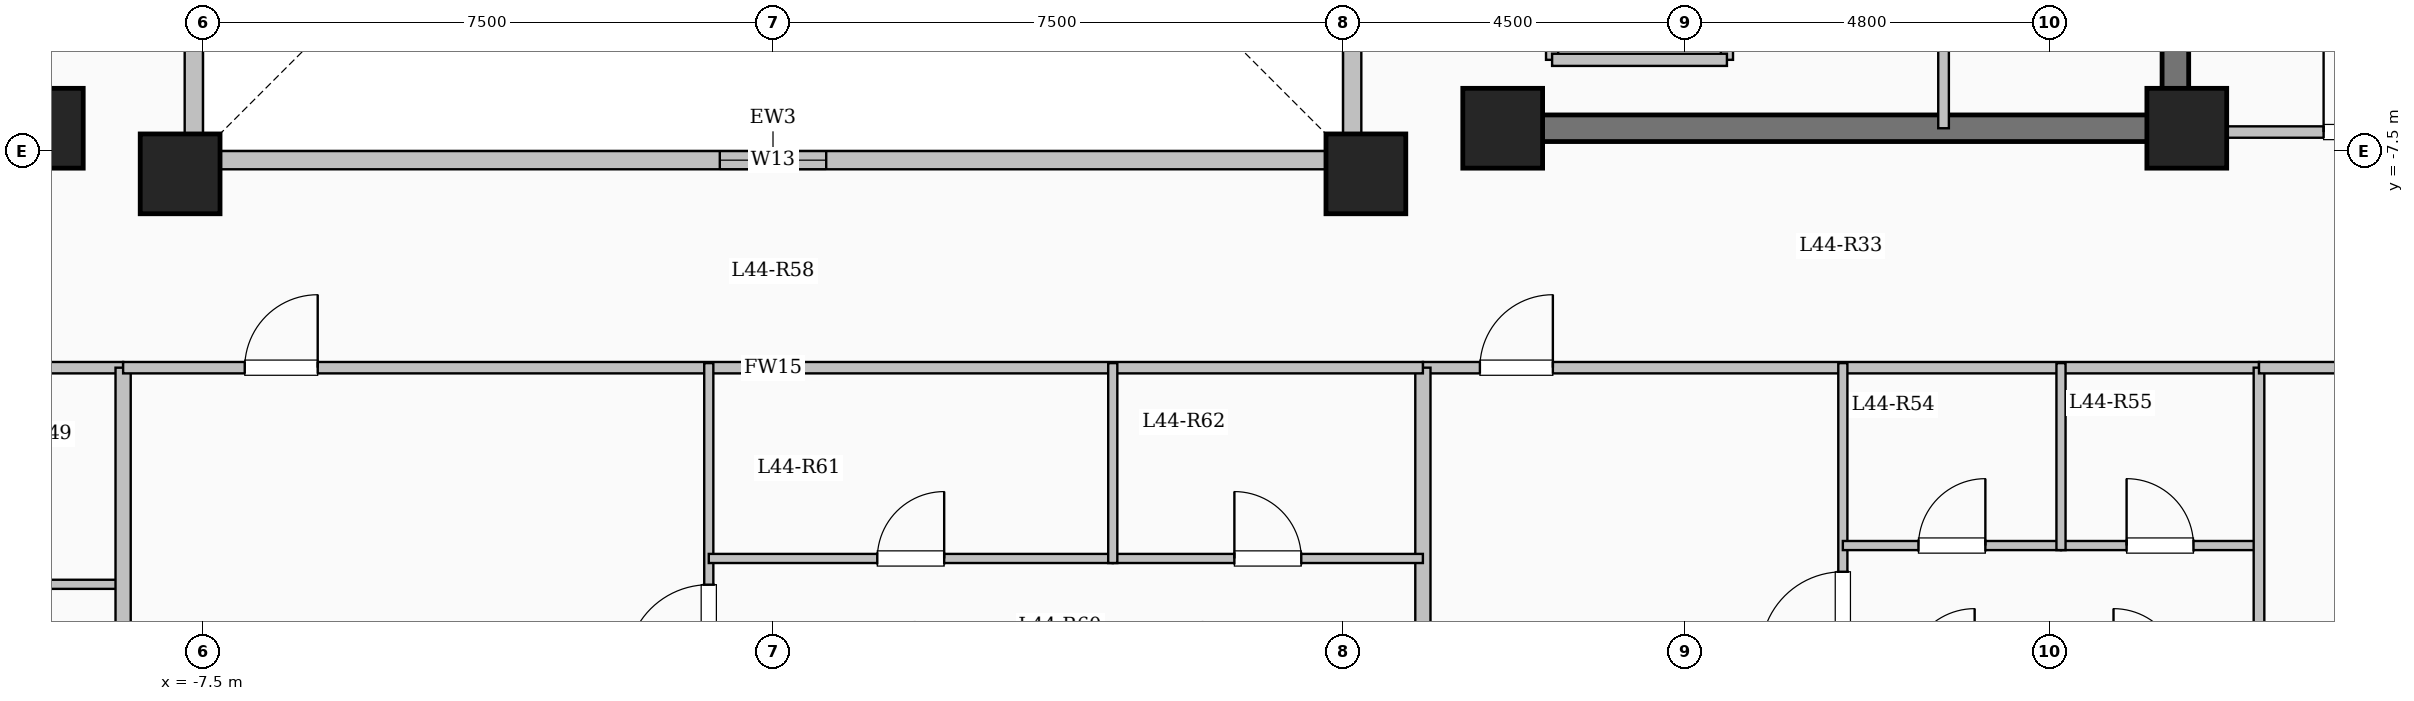
"""IFC4 building model, lengths in metres.
Left out: names, types, materials, properties, quantities, classifications, styles, units other than length and angle.
Written with IfcOpenShell. Run it as: python <this file> out.ifc"""

import sys

from ifc_helpers import new_model, si_unit, direction, frame, frame_2d, origin, origin_2d, place, context, subcontext, project, spatial, rectangle, extrude, element, fill, save


model = new_model("IFC4")
c1 = context("Model", 3, precision=1e-05, world=origin(), true_north=direction((0.0, 1.0)))
c2 = subcontext(c1, "Body", "Model", "MODEL_VIEW")
j1 = project(units=[si_unit("LENGTHUNIT", "METRE"), si_unit("PLANEANGLEUNIT", "RADIAN")], contexts=[c1])
p1 = place(None, origin())
s1 = spatial("IfcSite", under=j1, at=p1, CompositionType="ELEMENT")
p2 = place(p1, origin())
s2 = spatial("IfcBuilding", under=s1, at=p2, CompositionType="ELEMENT")
p3 = place(p2, frame((0.0, 0.0, 162.75)))
s3 = spatial("IfcBuildingStorey", under=s2, at=p3, CompositionType="ELEMENT", Elevation=162.75)
for number, where, z_axis, x_axis in (
    (1, (-7.8, -7.8, 0.0), (0.0, 0.0, 1.0), (1.0, 0.0, 0.0)),
    (2, (7.8, -7.8, 0.0), (0.0, 0.0, 1.0), (1.0, 0.0, 0.0)),
    (3, (-9.6, -7.2, 0.0), (0.0, 0.0, 1.0), (1.0, 0.0, 0.0)),
    (4, (9.6, -7.2, 0.0), (0.0, 0.0, 1.0), (1.0, 0.0, 0.0)),
    (5, (18.6, -7.2, 0.0), (0.0, 0.0, 1.0), (1.0, 0.0, 0.0)),
):
    element("IfcColumn", number, at=place(p3, frame(where, z_axis=z_axis, x_axis=x_axis)), inside=s3, PredefinedType="COLUMN", context=c2, shape_type="SweptSolid", body=[
        extrude(rectangle(XDim=1.05, YDim=1.05, at=origin_2d()), origin(), (0.0, 0.0, 1.0), 3.35),
    ])
p4 = place(p3, frame((-7.62, -7.62, 0.0), z_axis=(0.0, 0.0, 1.0), x_axis=(1.0, 0.0, 0.0)))
e6 = element("IfcWall", 6, at=p4, inside=s3, PredefinedType="SOLIDWALL", context=c2, shape_type="SweptSolid", body=[
    extrude(rectangle(XDim=15.24, YDim=0.24, at=frame_2d((7.62, 0.0))), origin(), (0.0, 0.0, 1.0), 3.1),
])
p5 = place(p4, frame((6.92, 0.0, 0.95)))
e7 = element("IfcOpeningElement", 7, at=p5, cuts=e6, PredefinedType="OPENING", context=c2, shape_type="SweptSolid", body=[
    extrude(rectangle(XDim=1.4, YDim=1.5, at=frame_2d((0.7, 0.75))), frame((0.0, 0.13, 0.0), z_axis=(0.0, -1.0, 0.0), x_axis=(1.0, 0.0, 0.0)), (0.0, 0.0, 1.0), 0.26),
])
p6 = place(p3, frame((7.62, -7.62, 0.0), z_axis=(0.0, 0.0, 1.0), x_axis=(0.0, 1.0, 0.0)))
e8 = element("IfcWall", 8, at=p6, inside=s3, PredefinedType="SOLIDWALL", context=c2, shape_type="SweptSolid", body=[
    extrude(rectangle(XDim=15.24, YDim=0.24, at=frame_2d((7.62, 0.0))), origin(), (0.0, 0.0, 1.0), 3.1),
])
p7 = place(p6, frame((6.92, 0.0, 0.95)))
e9 = element("IfcOpeningElement", 9, at=p7, cuts=e8, PredefinedType="OPENING", context=c2, shape_type="SweptSolid", body=[
    extrude(rectangle(XDim=1.4, YDim=1.5, at=frame_2d((0.7, 0.75))), frame((0.0, 0.13, 0.0), z_axis=(0.0, -1.0, 0.0), x_axis=(1.0, 0.0, 0.0)), (0.0, 0.0, 1.0), 0.26),
])
p8 = place(p3, frame((-7.62, 7.62, 0.0), z_axis=(0.0, 0.0, 1.0), x_axis=(0.0, -1.0, 0.0)))
e10 = element("IfcWall", 10, at=p8, inside=s3, PredefinedType="SOLIDWALL", context=c2, shape_type="SweptSolid", body=[
    extrude(rectangle(XDim=15.24, YDim=0.24, at=frame_2d((7.62, 0.0))), origin(), (0.0, 0.0, 1.0), 3.1),
])
p9 = place(p8, frame((6.92, 0.0, 0.95)))
e11 = element("IfcOpeningElement", 11, at=p9, cuts=e10, PredefinedType="OPENING", context=c2, shape_type="SweptSolid", body=[
    extrude(rectangle(XDim=1.4, YDim=1.5, at=frame_2d((0.7, 0.75))), frame((0.0, 0.13, 0.0), z_axis=(0.0, -1.0, 0.0), x_axis=(1.0, 0.0, 0.0)), (0.0, 0.0, 1.0), 0.26),
])
p10 = place(p3, frame((10.25, -6.3, 0.0), z_axis=(0.0, 0.0, 1.0), x_axis=(0.0, 1.0, 0.0)))
e12 = element("IfcWall", 12, at=p10, inside=s3, PredefinedType="SOLIDWALL", context=c2, shape_type="SweptSolid", body=[
    extrude(rectangle(XDim=2.6, YDim=0.16, at=frame_2d((1.3, 0.0))), origin(), (0.0, 0.0, 1.0), 3.1),
])
p11 = place(p10, frame((0.75, 0.0, 0.0)))
e13 = element("IfcOpeningElement", 13, at=p11, cuts=e12, PredefinedType="OPENING", context=c2, shape_type="SweptSolid", body=[
    extrude(rectangle(XDim=1.1, YDim=2.15, at=frame_2d((0.55, 1.075))), frame((0.0, 0.09, 0.0), z_axis=(0.0, -1.0, 0.0), x_axis=(1.0, 0.0, 0.0)), (0.0, 0.0, 1.0), 0.18),
])
p12 = place(p3, frame((12.55, -6.3, 0.0), z_axis=(0.0, 0.0, 1.0), x_axis=(0.0, 1.0, 0.0)))
e14 = element("IfcWall", 14, at=p12, inside=s3, PredefinedType="SOLIDWALL", context=c2, shape_type="SweptSolid", body=[
    extrude(rectangle(XDim=2.6, YDim=0.16, at=frame_2d((1.3, 0.0))), origin(), (0.0, 0.0, 1.0), 3.1),
])
p13 = place(p3, frame((10.25, -6.3, 0.0), z_axis=(0.0, 0.0, 1.0), x_axis=(1.0, 0.0, 0.0)))
e15 = element("IfcWall", 15, at=p13, inside=s3, PredefinedType="SOLIDWALL", context=c2, shape_type="SweptSolid", body=[
    extrude(rectangle(XDim=2.3, YDim=0.16, at=frame_2d((1.15, 0.0))), origin(), (0.0, 0.0, 1.0), 3.1),
])
p14 = place(p3, frame((18.45, -7.375, 0.0), z_axis=(0.0, 0.0, 1.0), x_axis=(0.0, 1.0, 0.0)))
e16 = element("IfcWall", 16, at=p14, inside=s3, PredefinedType="SHEAR", context=c2, shape_type="SweptSolid", body=[
    extrude(rectangle(XDim=14.05, YDim=0.35, at=frame_2d((7.025, 0.0))), origin(), (0.0, 0.0, 1.0), 3.35),
])
p15 = place(p3, frame((10.075, -7.2, 0.0), z_axis=(0.0, 0.0, 1.0), x_axis=(1.0, 0.0, 0.0)))
e17 = element("IfcWall", 17, at=p15, inside=s3, PredefinedType="SHEAR", context=c2, shape_type="SweptSolid", body=[
    extrude(rectangle(XDim=8.55, YDim=0.35, at=frame_2d((4.275, 0.0))), origin(), (0.0, 0.0, 1.0), 3.35),
])
p16 = place(p3, frame((15.4, -7.2, 0.0), z_axis=(0.0, 0.0, 1.0), x_axis=(0.0, 1.0, 0.0)))
e18 = element("IfcWall", 18, at=p16, inside=s3, PredefinedType="PARTITIONING", context=c2, shape_type="SweptSolid", body=[
    extrude(rectangle(XDim=10.45, YDim=0.14, at=frame_2d((5.225, 0.0))), origin(), (0.0, 0.0, 1.0), 3.1),
])
p17 = place(p16, frame((9.25, 0.0, 0.0)))
e19 = element("IfcOpeningElement", 19, at=p17, cuts=e18, PredefinedType="OPENING", context=c2, shape_type="SweptSolid", body=[
    extrude(rectangle(XDim=0.9, YDim=2.08, at=frame_2d((0.45, 1.04))), frame((0.0, 0.08, 0.0), z_axis=(0.0, -1.0, 0.0), x_axis=(1.0, 0.0, 0.0)), (0.0, 0.0, 1.0), 0.16),
])
p18 = place(p3, frame((-19.55, -10.35, 0.0), z_axis=(0.0, 0.0, 1.0), x_axis=(1.0, 0.0, 0.0)))
e20 = element("IfcWall", 20, at=p18, inside=s3, PredefinedType="PARTITIONING", context=c2, shape_type="SweptSolid", body=[
    extrude(rectangle(XDim=11.0, YDim=0.15, at=frame_2d((5.5, 0.0))), origin(), (0.0, 0.0, 1.0), 3.1),
])
p19 = place(p18, frame((0.7, 0.0, 0.0)))
e21 = element("IfcOpeningElement", 21, at=p19, cuts=e20, PredefinedType="OPENING", context=c2, shape_type="SweptSolid", body=[
    extrude(rectangle(XDim=0.96, YDim=2.15, at=frame_2d((0.48, 1.075))), frame((0.0, 0.085, 0.0), z_axis=(0.0, -1.0, 0.0), x_axis=(1.0, 0.0, 0.0)), (0.0, 0.0, 1.0), 0.17),
])
p20 = place(p3, frame((8.55, -10.35, 0.0), z_axis=(0.0, 0.0, 1.0), x_axis=(1.0, 0.0, 0.0)))
e22 = element("IfcWall", 22, at=p20, inside=s3, PredefinedType="PARTITIONING", context=c2, shape_type="SweptSolid", body=[
    extrude(rectangle(XDim=11.0, YDim=0.15, at=frame_2d((5.5, 0.0))), origin(), (0.0, 0.0, 1.0), 3.1),
])
p21 = place(p20, frame((0.75, 0.0, 0.0)))
e23 = element("IfcOpeningElement", 23, at=p21, cuts=e22, PredefinedType="OPENING", context=c2, shape_type="SweptSolid", body=[
    extrude(rectangle(XDim=0.96, YDim=2.15, at=frame_2d((0.48, 1.075))), frame((0.0, 0.085, 0.0), z_axis=(0.0, -1.0, 0.0), x_axis=(1.0, 0.0, 0.0)), (0.0, 0.0, 1.0), 0.17),
])
p22 = place(p3, frame((-11.422, -13.2, 0.0), z_axis=(0.0, 0.0, 1.0), x_axis=(1.0, 0.0, 0.0)))
e24 = element("IfcWall", 24, at=p22, inside=s3, PredefinedType="PARTITIONING", context=c2, shape_type="SweptSolid", body=[
    extrude(rectangle(XDim=2.822, YDim=0.12, at=frame_2d((1.411, 0.0))), origin(), (0.0, 0.0, 1.0), 3.1),
])
p23 = place(p22, frame((0.971, 0.0, 0.0)))
e25 = element("IfcOpeningElement", 25, at=p23, cuts=e24, PredefinedType="OPENING", context=c2, shape_type="SweptSolid", body=[
    extrude(rectangle(XDim=0.88, YDim=2.1, at=frame_2d((0.44, 1.05))), frame((0.0, 0.07, 0.0), z_axis=(0.0, -1.0, 0.0), x_axis=(1.0, 0.0, 0.0)), (0.0, 0.0, 1.0), 0.14),
])
p24 = place(p3, frame((14.075, -21.2, 0.0), z_axis=(0.0, 0.0, 1.0), x_axis=(0.0, 1.0, 0.0)))
e26 = element("IfcWall", 26, at=p24, inside=s3, PredefinedType="PARTITIONING", context=c2, shape_type="SweptSolid", body=[
    extrude(rectangle(XDim=10.91, YDim=0.12, at=frame_2d((5.455, 0.0))), origin(), (0.0, 0.0, 1.0), 3.1),
])
p25 = place(p24, frame((7.085, 0.0, 0.0)))
e27 = element("IfcOpeningElement", 27, at=p25, cuts=e26, PredefinedType="OPENING", context=c2, shape_type="SweptSolid", body=[
    extrude(rectangle(XDim=1.08, YDim=2.15, at=frame_2d((0.54, 1.075))), frame((0.0, 0.07, 0.0), z_axis=(0.0, -1.0, 0.0), x_axis=(1.0, 0.0, 0.0)), (0.0, 0.0, 1.0), 0.14),
])
p26 = place(p3, frame((14.075, -12.69, 0.0), z_axis=(0.0, 0.0, 1.0), x_axis=(1.0, 0.0, 0.0)))
e28 = element("IfcWall", 28, at=p26, inside=s3, PredefinedType="PARTITIONING", context=c2, shape_type="SweptSolid", body=[
    extrude(rectangle(XDim=2.87, YDim=0.12, at=frame_2d((1.435, 0.0))), origin(), (0.0, 0.0, 1.0), 3.1),
])
p27 = place(p26, frame((0.995, 0.0, 0.0)))
e29 = element("IfcOpeningElement", 29, at=p27, cuts=e28, PredefinedType="OPENING", context=c2, shape_type="SweptSolid", body=[
    extrude(rectangle(XDim=0.88, YDim=2.1, at=frame_2d((0.44, 1.05))), frame((0.0, 0.07, 0.0), z_axis=(0.0, -1.0, 0.0), x_axis=(1.0, 0.0, 0.0)), (0.0, 0.0, 1.0), 0.14),
])
p28 = place(p3, frame((16.945, -12.69, 0.0), z_axis=(0.0, 0.0, 1.0), x_axis=(1.0, 0.0, 0.0)))
e30 = element("IfcWall", 30, at=p28, inside=s3, PredefinedType="PARTITIONING", context=c2, shape_type="SweptSolid", body=[
    extrude(rectangle(XDim=2.605, YDim=0.12, at=frame_2d((1.302, 0.0))), origin(), (0.0, 0.0, 1.0), 3.1),
])
p29 = place(p28, frame((0.863, 0.0, 0.0)))
e31 = element("IfcOpeningElement", 31, at=p29, cuts=e30, PredefinedType="OPENING", context=c2, shape_type="SweptSolid", body=[
    extrude(rectangle(XDim=0.88, YDim=2.1, at=frame_2d((0.44, 1.05))), frame((0.0, 0.07, 0.0), z_axis=(0.0, -1.0, 0.0), x_axis=(1.0, 0.0, 0.0)), (0.0, 0.0, 1.0), 0.14),
])
p30 = place(p3, frame((16.945, -12.75, 0.0), z_axis=(0.0, 0.0, 1.0), x_axis=(0.0, 1.0, 0.0)))
e32 = element("IfcWall", 32, at=p30, inside=s3, PredefinedType="PARTITIONING", context=c2, shape_type="SweptSolid", body=[
    extrude(rectangle(XDim=2.46, YDim=0.12, at=frame_2d((1.23, 0.0))), origin(), (0.0, 0.0, 1.0), 3.1),
])
for number, where, z_axis, x_axis in (
    (33, (-8.55, -21.804, 0.0), (0.0, 0.0, 1.0), (0.0, 1.0, 0.0)),
    (34, (8.55, -21.804, 0.0), (0.0, 0.0, 1.0), (0.0, 1.0, 0.0)),
):
    element("IfcWall", number, at=place(p3, frame(where, z_axis=z_axis, x_axis=x_axis)), inside=s3, PredefinedType="SOLIDWALL", context=c2, shape_type="SweptSolid", body=[
        extrude(rectangle(XDim=11.454, YDim=0.2, at=frame_2d((5.727, 0.0))), origin(), (0.0, 0.0, 1.0), 3.1),
    ])
p31 = place(p3, frame((-8.55, -10.35, 0.0), z_axis=(0.0, 0.0, 1.0), x_axis=(1.0, 0.0, 0.0)))
e35 = element("IfcWall", 35, at=p31, inside=s3, PredefinedType="PARTITIONING", context=c2, shape_type="SweptSolid", body=[
    extrude(rectangle(XDim=17.1, YDim=0.15, at=frame_2d((8.55, 0.0))), origin(), (0.0, 0.0, 1.0), 3.1),
])
p32 = place(p31, frame((1.6, 0.0, 0.0)))
e36 = element("IfcOpeningElement", 36, at=p32, cuts=e35, PredefinedType="OPENING", context=c2, shape_type="SweptSolid", body=[
    extrude(rectangle(XDim=0.96, YDim=2.15, at=frame_2d((0.48, 1.075))), frame((0.0, 0.085, 0.0), z_axis=(0.0, -1.0, 0.0), x_axis=(1.0, 0.0, 0.0)), (0.0, 0.0, 1.0), 0.17),
])
p33 = place(p3, frame((-0.845, -22.68, 0.0), z_axis=(0.0, 0.0, 1.0), x_axis=(0.0, 1.0, 0.0)))
e37 = element("IfcWall", 37, at=p33, inside=s3, PredefinedType="PARTITIONING", context=c2, shape_type="SweptSolid", body=[
    extrude(rectangle(XDim=12.39, YDim=0.12, at=frame_2d((6.195, 0.0))), origin(), (0.0, 0.0, 1.0), 3.1),
])
p34 = place(p33, frame((8.395, 0.0, 0.0)))
e38 = element("IfcOpeningElement", 38, at=p34, cuts=e37, PredefinedType="OPENING", context=c2, shape_type="SweptSolid", body=[
    extrude(rectangle(XDim=1.08, YDim=2.15, at=frame_2d((0.54, 1.075))), frame((0.0, 0.07, 0.0), z_axis=(0.0, -1.0, 0.0), x_axis=(1.0, 0.0, 0.0)), (0.0, 0.0, 1.0), 0.14),
])
p35 = place(p3, frame((-0.845, -12.86, 0.0), z_axis=(0.0, 0.0, 1.0), x_axis=(1.0, 0.0, 0.0)))
e39 = element("IfcWall", 39, at=p35, inside=s3, PredefinedType="PARTITIONING", context=c2, shape_type="SweptSolid", body=[
    extrude(rectangle(XDim=5.315, YDim=0.12, at=frame_2d((2.657, 0.0))), origin(), (0.0, 0.0, 1.0), 3.1),
])
p36 = place(p35, frame((2.217, 0.0, 0.0)))
e40 = element("IfcOpeningElement", 40, at=p36, cuts=e39, PredefinedType="OPENING", context=c2, shape_type="SweptSolid", body=[
    extrude(rectangle(XDim=0.88, YDim=2.1, at=frame_2d((0.44, 1.05))), frame((0.0, 0.07, 0.0), z_axis=(0.0, -1.0, 0.0), x_axis=(1.0, 0.0, 0.0)), (0.0, 0.0, 1.0), 0.14),
])
p37 = place(p3, frame((4.47, -12.86, 0.0), z_axis=(0.0, 0.0, 1.0), x_axis=(1.0, 0.0, 0.0)))
e41 = element("IfcWall", 41, at=p37, inside=s3, PredefinedType="PARTITIONING", context=c2, shape_type="SweptSolid", body=[
    extrude(rectangle(XDim=4.08, YDim=0.12, at=frame_2d((2.04, 0.0))), origin(), (0.0, 0.0, 1.0), 3.1),
])
p38 = place(p37, frame((1.6, 0.0, 0.0)))
e42 = element("IfcOpeningElement", 42, at=p38, cuts=e41, PredefinedType="OPENING", context=c2, shape_type="SweptSolid", body=[
    extrude(rectangle(XDim=0.88, YDim=2.1, at=frame_2d((0.44, 1.05))), frame((0.0, 0.07, 0.0), z_axis=(0.0, -1.0, 0.0), x_axis=(1.0, 0.0, 0.0)), (0.0, 0.0, 1.0), 0.14),
])
p39 = place(p3, frame((4.47, -12.92, 0.0), z_axis=(0.0, 0.0, 1.0), x_axis=(0.0, 1.0, 0.0)))
e43 = element("IfcWall", 43, at=p39, inside=s3, PredefinedType="PARTITIONING", context=c2, shape_type="SweptSolid", body=[
    extrude(rectangle(XDim=2.63, YDim=0.12, at=frame_2d((1.315, 0.0))), origin(), (0.0, 0.0, 1.0), 3.1),
])
p40 = place(p3, frame((18.45, -7.25, 0.0), z_axis=(0.0, 0.0, 1.0), x_axis=(1.0, 0.0, 0.0)))
e44 = element("IfcWall", 44, at=p40, inside=s3, PredefinedType="PARTITIONING", context=c2, shape_type="SweptSolid", body=[
    extrude(rectangle(XDim=6.63, YDim=0.15, at=frame_2d((3.315, 0.0))), origin(), (0.0, 0.0, 1.0), 3.1),
])
p41 = place(p40, frame((1.95, 0.0, 0.0)))
e45 = element("IfcOpeningElement", 45, at=p41, cuts=e44, PredefinedType="OPENING", context=c2, shape_type="SweptSolid", body=[
    extrude(rectangle(XDim=1.08, YDim=2.15, at=frame_2d((0.54, 1.075))), frame((0.0, 0.085, 0.0), z_axis=(0.0, -1.0, 0.0), x_axis=(1.0, 0.0, 0.0)), (0.0, 0.0, 1.0), 0.17),
])
p42 = place(p3, frame((19.55, -17.25, 0.0), z_axis=(0.0, 0.0, 1.0), x_axis=(0.0, 1.0, 0.0)))
e46 = element("IfcWall", 46, at=p42, inside=s3, PredefinedType="PARTITIONING", context=c2, shape_type="SweptSolid", body=[
    extrude(rectangle(XDim=6.9, YDim=0.14, at=frame_2d((3.45, 0.0))), origin(), (0.0, 0.0, 1.0), 3.1),
])
p43 = place(p3, frame((19.55, -10.35, 0.0), z_axis=(0.0, 0.0, 1.0), x_axis=(1.0, 0.0, 0.0)))
e47 = element("IfcWall", 47, at=p43, inside=s3, PredefinedType="PARTITIONING", context=c2, shape_type="SweptSolid", body=[
    extrude(rectangle(XDim=5.53, YDim=0.15, at=frame_2d((2.765, 0.0))), origin(), (0.0, 0.0, 1.0), 3.1),
])
p44 = place(p43, frame((2.29, 0.0, 0.0)))
e48 = element("IfcOpeningElement", 48, at=p44, cuts=e47, PredefinedType="OPENING", context=c2, shape_type="SweptSolid", body=[
    extrude(rectangle(XDim=0.95, YDim=2.15, at=frame_2d((0.475, 1.075))), frame((0.0, 0.085, 0.0), z_axis=(0.0, -1.0, 0.0), x_axis=(1.0, 0.0, 0.0)), (0.0, 0.0, 1.0), 0.17),
])
p45 = place(p5, origin())
e49 = element("IfcWindow", 49, at=p45, inside=s3, PartitioningType="SINGLE_PANEL", PredefinedType="WINDOW", context=c2, shape_type="SweptSolid", body=[
    extrude(rectangle(XDim=1.4, YDim=1.5, at=frame_2d((0.7, 0.75))), frame((0.0, 0.03, 0.0), z_axis=(0.0, -1.0, 0.0), x_axis=(1.0, 0.0, 0.0)), (0.0, 0.0, 1.0), 0.06),
])
fill(e7, e49)
p46 = place(p21, origin())
e50 = element("IfcDoor", 50, at=p46, inside=s3, OperationType="SINGLE_SWING_RIGHT", PredefinedType="DOOR", context=c2, shape_type="SweptSolid", body=[
    extrude(rectangle(XDim=0.96, YDim=2.15, at=frame_2d((0.48, 1.075))), frame((0.0, 0.025, 0.0), z_axis=(0.0, -1.0, 0.0), x_axis=(1.0, 0.0, 0.0)), (0.0, 0.0, 1.0), 0.05),
])
fill(e23, e50)
p47 = place(p25, origin())
e51 = element("IfcDoor", 51, at=p47, inside=s3, OperationType="SINGLE_SWING_LEFT", PredefinedType="DOOR", context=c2, shape_type="SweptSolid", body=[
    extrude(rectangle(XDim=1.08, YDim=2.15, at=frame_2d((0.54, 1.075))), frame((0.0, 0.025, 0.0), z_axis=(0.0, -1.0, 0.0), x_axis=(1.0, 0.0, 0.0)), (0.0, 0.0, 1.0), 0.05),
])
fill(e27, e51)
p48 = place(p27, origin())
e52 = element("IfcDoor", 52, at=p48, inside=s3, OperationType="SINGLE_SWING_RIGHT", PredefinedType="DOOR", context=c2, shape_type="SweptSolid", body=[
    extrude(rectangle(XDim=0.88, YDim=2.1, at=frame_2d((0.44, 1.05))), frame((0.0, 0.025, 0.0), z_axis=(0.0, -1.0, 0.0), x_axis=(1.0, 0.0, 0.0)), (0.0, 0.0, 1.0), 0.05),
])
fill(e29, e52)
p49 = place(p29, origin())
e53 = element("IfcDoor", 53, at=p49, inside=s3, OperationType="SINGLE_SWING_LEFT", PredefinedType="DOOR", context=c2, shape_type="SweptSolid", body=[
    extrude(rectangle(XDim=0.88, YDim=2.1, at=frame_2d((0.44, 1.05))), frame((0.0, 0.025, 0.0), z_axis=(0.0, -1.0, 0.0), x_axis=(1.0, 0.0, 0.0)), (0.0, 0.0, 1.0), 0.05),
])
fill(e31, e53)
p50 = place(p32, origin())
e54 = element("IfcDoor", 54, at=p50, inside=s3, OperationType="SINGLE_SWING_RIGHT", PredefinedType="DOOR", context=c2, shape_type="SweptSolid", body=[
    extrude(rectangle(XDim=0.96, YDim=2.15, at=frame_2d((0.48, 1.075))), frame((0.0, 0.025, 0.0), z_axis=(0.0, -1.0, 0.0), x_axis=(1.0, 0.0, 0.0)), (0.0, 0.0, 1.0), 0.05),
])
fill(e36, e54)
p51 = place(p34, origin())
e55 = element("IfcDoor", 55, at=p51, inside=s3, OperationType="SINGLE_SWING_LEFT", PredefinedType="DOOR", context=c2, shape_type="SweptSolid", body=[
    extrude(rectangle(XDim=1.08, YDim=2.15, at=frame_2d((0.54, 1.075))), frame((0.0, 0.025, 0.0), z_axis=(0.0, -1.0, 0.0), x_axis=(1.0, 0.0, 0.0)), (0.0, 0.0, 1.0), 0.05),
])
fill(e38, e55)
p52 = place(p36, origin())
e56 = element("IfcDoor", 56, at=p52, inside=s3, OperationType="SINGLE_SWING_RIGHT", PredefinedType="DOOR", context=c2, shape_type="SweptSolid", body=[
    extrude(rectangle(XDim=0.88, YDim=2.1, at=frame_2d((0.44, 1.05))), frame((0.0, 0.025, 0.0), z_axis=(0.0, -1.0, 0.0), x_axis=(1.0, 0.0, 0.0)), (0.0, 0.0, 1.0), 0.05),
])
fill(e40, e56)
p53 = place(p38, origin())
e57 = element("IfcDoor", 57, at=p53, inside=s3, OperationType="SINGLE_SWING_LEFT", PredefinedType="DOOR", context=c2, shape_type="SweptSolid", body=[
    extrude(rectangle(XDim=0.88, YDim=2.1, at=frame_2d((0.44, 1.05))), frame((0.0, 0.025, 0.0), z_axis=(0.0, -1.0, 0.0), x_axis=(1.0, 0.0, 0.0)), (0.0, 0.0, 1.0), 0.05),
])
fill(e42, e57)
p54 = place(p41, origin())
e58 = element("IfcDoor", 58, at=p54, inside=s3, OperationType="SINGLE_SWING_LEFT", PredefinedType="DOOR", context=c2, shape_type="SweptSolid", body=[
    extrude(rectangle(XDim=1.08, YDim=2.15, at=frame_2d((0.54, 1.075))), frame((0.0, 0.025, 0.0), z_axis=(0.0, -1.0, 0.0), x_axis=(1.0, 0.0, 0.0)), (0.0, 0.0, 1.0), 0.05),
])
fill(e45, e58)
save(model, sys.argv[1])
